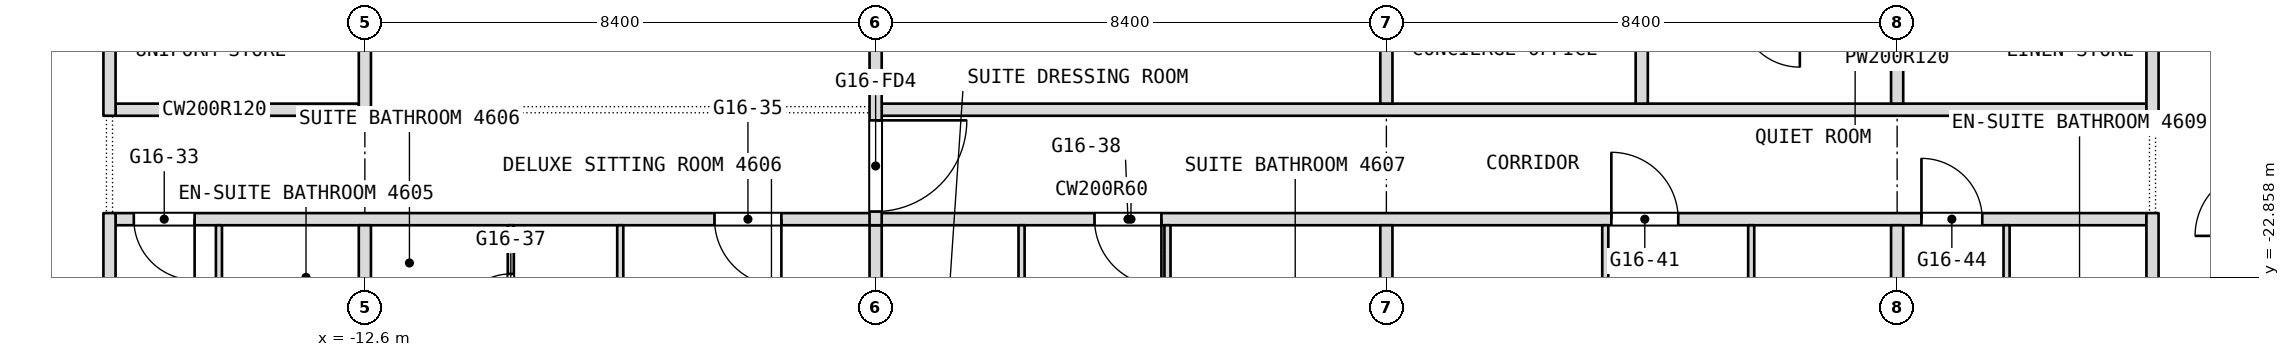
"""IFC4 building model, lengths in metres.
Left out: names, types, materials, properties, quantities, classifications, styles, units other than length and angle.
Written with IfcOpenShell. Run it as: python <this file> out.ifc"""

import sys

from ifc_helpers import new_model, si_unit, direction, frame, frame_2d, origin, place, context, subcontext, project, spatial, rectangle, extrude, element, fill, save


model = new_model("IFC4")
c1 = context("Model", 3, precision=1e-05, world=origin(), true_north=direction((0.0, 1.0)))
c2 = subcontext(c1, "Body", "Model", "MODEL_VIEW")
j1 = project(units=[si_unit("LENGTHUNIT", "METRE"), si_unit("PLANEANGLEUNIT", "RADIAN")], contexts=[c1])
p1 = place(None, origin())
s1 = spatial("IfcSite", under=j1, at=p1, CompositionType="ELEMENT")
p2 = place(p1, origin())
s2 = spatial("IfcBuilding", under=s1, at=p2, CompositionType="ELEMENT")
p3 = place(p2, frame((0.0, 0.0, 202.1)))
s3 = spatial("IfcBuildingStorey", under=s2, at=p3, CompositionType="ELEMENT", Elevation=202.1)
p4 = place(p3, frame((-16.7, -21.9, 0.0), z_axis=(0.0, 0.0, 1.0), x_axis=(1.0, 0.0, 0.0)))
e1 = element("IfcWall", 1, at=p4, inside=s3, PredefinedType="PARTITIONING", context=c2, shape_type="SweptSolid", body=[
    extrude(rectangle(XDim=33.4, YDim=0.2, at=frame_2d((16.7, 0.0))), origin(), (0.0, 0.0, 1.0), 3.34),
])
p5 = place(p4, frame((0.3, 0.0, 0.0)))
e2 = element("IfcOpeningElement", 2, at=p5, cuts=e1, PredefinedType="OPENING", context=c2, shape_type="SweptSolid", body=[
    extrude(rectangle(XDim=1.0, YDim=2.1, at=frame_2d((0.5, 1.05))), frame((0.0, 0.1, 0.0), z_axis=(0.0, -1.0, 0.0), x_axis=(1.0, 0.0, 0.0)), (0.0, 0.0, 1.0), 0.2),
])
p6 = place(p4, frame((9.85, 0.0, 0.0)))
e3 = element("IfcOpeningElement", 3, at=p6, cuts=e1, PredefinedType="OPENING", context=c2, shape_type="SweptSolid", body=[
    extrude(rectangle(XDim=1.1, YDim=2.1, at=frame_2d((0.55, 1.05))), frame((0.0, 0.1, 0.0), z_axis=(0.0, -1.0, 0.0), x_axis=(1.0, 0.0, 0.0)), (0.0, 0.0, 1.0), 0.2),
])
p7 = place(p4, frame((16.1, 0.0, 0.0)))
e4 = element("IfcOpeningElement", 4, at=p7, cuts=e1, PredefinedType="OPENING", context=c2, shape_type="SweptSolid", body=[
    extrude(rectangle(XDim=1.1, YDim=2.1, at=frame_2d((0.55, 1.05))), frame((0.0, 0.1, 0.0), z_axis=(0.0, -1.0, 0.0), x_axis=(1.0, 0.0, 0.0)), (0.0, 0.0, 1.0), 0.2),
])
p8 = place(p4, frame((24.6, 0.0, 0.0)))
e5 = element("IfcOpeningElement", 5, at=p8, cuts=e1, PredefinedType="OPENING", context=c2, shape_type="SweptSolid", body=[
    extrude(rectangle(XDim=1.1, YDim=2.1, at=frame_2d((0.55, 1.05))), frame((0.0, 0.1, 0.0), z_axis=(0.0, -1.0, 0.0), x_axis=(1.0, 0.0, 0.0)), (0.0, 0.0, 1.0), 0.2),
])
p9 = place(p4, frame((29.7, 0.0, 0.0)))
e6 = element("IfcOpeningElement", 6, at=p9, cuts=e1, PredefinedType="OPENING", context=c2, shape_type="SweptSolid", body=[
    extrude(rectangle(XDim=1.0, YDim=2.1, at=frame_2d((0.5, 1.05))), frame((0.0, 0.1, 0.0), z_axis=(0.0, -1.0, 0.0), x_axis=(1.0, 0.0, 0.0)), (0.0, 0.0, 1.0), 0.2),
])
p10 = place(p3, frame((-16.7, -20.1, 0.0), z_axis=(0.0, 0.0, 1.0), x_axis=(1.0, 0.0, 0.0)))
e7 = element("IfcWall", 7, at=p10, inside=s3, PredefinedType="PARTITIONING", context=c2, shape_type="SweptSolid", body=[
    extrude(rectangle(XDim=4.0, YDim=0.2, at=frame_2d((2.0, 0.0))), origin(), (0.0, 0.0, 1.0), 3.34),
])
p11 = place(p3, frame((-4.1, -20.1, 0.0), z_axis=(0.0, 0.0, 1.0), x_axis=(1.0, 0.0, 0.0)))
e8 = element("IfcWall", 8, at=p11, inside=s3, PredefinedType="PARTITIONING", context=c2, shape_type="SweptSolid", body=[
    extrude(rectangle(XDim=20.8, YDim=0.2, at=frame_2d((10.4, 0.0))), origin(), (0.0, 0.0, 1.0), 3.34),
])
p12 = place(p3, frame((16.8, -27.229, 0.0), z_axis=(0.0, 0.0, 1.0), x_axis=(0.0, 1.0, 0.0)))
e9 = element("IfcWall", 9, at=p12, inside=s3, PredefinedType="PARTITIONING", context=c2, shape_type="SweptSolid", body=[
    extrude(rectangle(XDim=5.429, YDim=0.2, at=frame_2d((2.714, 0.0))), origin(), (0.0, 0.0, 1.0), 3.34),
])
p13 = place(p3, frame((16.8, -20.2, 0.0), z_axis=(0.0, 0.0, 1.0), x_axis=(0.0, 1.0, 0.0)))
e10 = element("IfcWall", 10, at=p13, inside=s3, PredefinedType="PARTITIONING", context=c2, shape_type="SweptSolid", body=[
    extrude(rectangle(XDim=6.8, YDim=0.2, at=frame_2d((3.4, 0.0))), origin(), (0.0, 0.0, 1.0), 3.34),
])
p14 = place(p3, frame((14.4, -25.85, 0.0), z_axis=(0.0, 0.0, 1.0), x_axis=(0.0, 1.0, 0.0)))
e11 = element("IfcWall", 11, at=p14, inside=s3, PredefinedType="PARTITIONING", context=c2, shape_type="SweptSolid", body=[
    extrude(rectangle(XDim=3.85, YDim=0.1, at=frame_2d((1.925, 0.0))), origin(), (0.0, 0.0, 1.0), 3.34),
])
p15 = place(p3, frame((12.6, -28.343, 0.0), z_axis=(0.0, 0.0, 1.0), x_axis=(0.0, 1.0, 0.0)))
e12 = element("IfcWall", 12, at=p15, inside=s3, PredefinedType="PARTITIONING", context=c2, shape_type="SweptSolid", body=[
    extrude(rectangle(XDim=6.343, YDim=0.2, at=frame_2d((3.171, 0.0))), origin(), (0.0, 0.0, 1.0), 3.34),
])
p16 = place(p3, frame((12.6, -20.0, 0.0), z_axis=(0.0, 0.0, 1.0), x_axis=(0.0, 1.0, 0.0)))
e13 = element("IfcWall", 13, at=p16, inside=s3, PredefinedType="PARTITIONING", context=c2, shape_type="SweptSolid", body=[
    extrude(rectangle(XDim=1.5, YDim=0.2, at=frame_2d((0.75, 0.0))), origin(), (0.0, 0.0, 1.0), 3.34),
])
p17 = place(p3, frame((10.2, -25.55, 0.0), z_axis=(0.0, 0.0, 1.0), x_axis=(0.0, 1.0, 0.0)))
e14 = element("IfcWall", 14, at=p17, inside=s3, PredefinedType="PARTITIONING", context=c2, shape_type="SweptSolid", body=[
    extrude(rectangle(XDim=3.55, YDim=0.1, at=frame_2d((1.775, 0.0))), origin(), (0.0, 0.0, 1.0), 3.34),
])
p18 = place(p3, frame((8.4, -20.0, 0.0), z_axis=(0.0, 0.0, 1.0), x_axis=(0.0, 1.0, 0.0)))
e15 = element("IfcWall", 15, at=p18, inside=s3, PredefinedType="PARTITIONING", context=c2, shape_type="SweptSolid", body=[
    extrude(rectangle(XDim=1.5, YDim=0.2, at=frame_2d((0.75, 0.0))), origin(), (0.0, 0.0, 1.0), 3.34),
])
p19 = place(p3, frame((7.8, -25.45, 0.0), z_axis=(0.0, 0.0, 1.0), x_axis=(0.0, 1.0, 0.0)))
e16 = element("IfcWall", 16, at=p19, inside=s3, PredefinedType="PARTITIONING", context=c2, shape_type="SweptSolid", body=[
    extrude(rectangle(XDim=3.45, YDim=0.1, at=frame_2d((1.725, 0.0))), origin(), (0.0, 0.0, 1.0), 3.34),
])
p20 = place(p3, frame((4.2, -28.9, 0.0), z_axis=(0.0, 0.0, 1.0), x_axis=(0.0, 1.0, 0.0)))
e17 = element("IfcWall", 17, at=p20, inside=s3, PredefinedType="PARTITIONING", context=c2, shape_type="SweptSolid", body=[
    extrude(rectangle(XDim=6.9, YDim=0.2, at=frame_2d((3.45, 0.0))), origin(), (0.0, 0.0, 1.0), 3.34),
])
p21 = place(p3, frame((4.2, -20.0, 0.0), z_axis=(0.0, 0.0, 1.0), x_axis=(0.0, 1.0, 0.0)))
e18 = element("IfcWall", 18, at=p21, inside=s3, PredefinedType="PARTITIONING", context=c2, shape_type="SweptSolid", body=[
    extrude(rectangle(XDim=6.4, YDim=0.2, at=frame_2d((3.2, 0.0))), origin(), (0.0, 0.0, 1.0), 3.34),
])
p22 = place(p3, frame((0.6, -25.55, 0.0), z_axis=(0.0, 0.0, 1.0), x_axis=(0.0, 1.0, 0.0)))
e19 = element("IfcWall", 19, at=p22, inside=s3, PredefinedType="PARTITIONING", context=c2, shape_type="SweptSolid", body=[
    extrude(rectangle(XDim=3.55, YDim=0.1, at=frame_2d((1.775, 0.0))), origin(), (0.0, 0.0, 1.0), 3.34),
])
p23 = place(p3, frame((-1.8, -25.45, 0.0), z_axis=(0.0, 0.0, 1.0), x_axis=(0.0, 1.0, 0.0)))
e20 = element("IfcWall", 20, at=p23, inside=s3, PredefinedType="PARTITIONING", context=c2, shape_type="SweptSolid", body=[
    extrude(rectangle(XDim=3.45, YDim=0.1, at=frame_2d((1.725, 0.0))), origin(), (0.0, 0.0, 1.0), 3.34),
])
p24 = place(p3, frame((-4.2, -28.9, 0.0), z_axis=(0.0, 0.0, 1.0), x_axis=(0.0, 1.0, 0.0)))
e21 = element("IfcWall", 21, at=p24, inside=s3, PredefinedType="PARTITIONING", context=c2, shape_type="SweptSolid", body=[
    extrude(rectangle(XDim=6.9, YDim=0.2, at=frame_2d((3.45, 0.0))), origin(), (0.0, 0.0, 1.0), 3.34),
])
p25 = place(p3, frame((-4.2, -22.0, 0.0), z_axis=(0.0, 0.0, 1.0), x_axis=(0.0, 1.0, 0.0)))
e22 = element("IfcWall", 22, at=p25, inside=s3, PredefinedType="PARTITIONING", context=c2, shape_type="SweptSolid", body=[
    extrude(rectangle(XDim=8.4, YDim=0.2, at=frame_2d((4.2, 0.0))), origin(), (0.0, 0.0, 1.0), 3.34),
])
p26 = place(p25, frame((0.225, 0.0, 0.0)))
e23 = element("IfcOpeningElement", 23, at=p26, cuts=e22, PredefinedType="OPENING", context=c2, shape_type="SweptSolid", body=[
    extrude(rectangle(XDim=1.5, YDim=2.1, at=frame_2d((0.75, 1.05))), frame((0.0, 0.1, 0.0), z_axis=(0.0, -1.0, 0.0), x_axis=(1.0, 0.0, 0.0)), (0.0, 0.0, 1.0), 0.2),
])
p27 = place(p3, frame((-8.4, -28.9, 0.0), z_axis=(0.0, 0.0, 1.0), x_axis=(0.0, 1.0, 0.0)))
e24 = element("IfcWall", 24, at=p27, inside=s3, PredefinedType="PARTITIONING", context=c2, shape_type="SweptSolid", body=[
    extrude(rectangle(XDim=6.9, YDim=0.1, at=frame_2d((3.45, 0.0))), origin(), (0.0, 0.0, 1.0), 3.34),
])
p28 = place(p27, frame((2.53, 0.0, 0.0)))
e25 = element("IfcOpeningElement", 25, at=p28, cuts=e24, PredefinedType="OPENING", context=c2, shape_type="SweptSolid", body=[
    extrude(rectangle(XDim=0.9, YDim=2.1, at=frame_2d((0.45, 1.05))), frame((0.0, 0.05, 0.0), z_axis=(0.0, -1.0, 0.0), x_axis=(1.0, 0.0, 0.0)), (0.0, 0.0, 1.0), 0.1),
])
p29 = place(p3, frame((-10.2, -24.55, 0.0), z_axis=(0.0, 0.0, 1.0), x_axis=(0.0, 1.0, 0.0)))
e26 = element("IfcWall", 26, at=p29, inside=s3, PredefinedType="PARTITIONING", context=c2, shape_type="SweptSolid", body=[
    extrude(rectangle(XDim=2.55, YDim=0.1, at=frame_2d((1.275, 0.0))), origin(), (0.0, 0.0, 1.0), 3.34),
])
p30 = place(p29, frame((0.85, 0.0, 0.0)))
e27 = element("IfcOpeningElement", 27, at=p30, cuts=e26, PredefinedType="OPENING", context=c2, shape_type="SweptSolid", body=[
    extrude(rectangle(XDim=0.9, YDim=2.1, at=frame_2d((0.45, 1.05))), frame((0.0, 0.05, 0.0), z_axis=(0.0, -1.0, 0.0), x_axis=(1.0, 0.0, 0.0)), (0.0, 0.0, 1.0), 0.1),
])
p31 = place(p3, frame((-12.6, -28.343, 0.0), z_axis=(0.0, 0.0, 1.0), x_axis=(0.0, 1.0, 0.0)))
e28 = element("IfcWall", 28, at=p31, inside=s3, PredefinedType="PARTITIONING", context=c2, shape_type="SweptSolid", body=[
    extrude(rectangle(XDim=6.343, YDim=0.2, at=frame_2d((3.171, 0.0))), origin(), (0.0, 0.0, 1.0), 3.34),
])
p32 = place(p3, frame((-12.6, -20.2, 0.0), z_axis=(0.0, 0.0, 1.0), x_axis=(0.0, 1.0, 0.0)))
e29 = element("IfcWall", 29, at=p32, inside=s3, PredefinedType="PARTITIONING", context=c2, shape_type="SweptSolid", body=[
    extrude(rectangle(XDim=6.8, YDim=0.2, at=frame_2d((3.4, 0.0))), origin(), (0.0, 0.0, 1.0), 3.34),
])
p33 = place(p3, frame((-15.0, -24.75, 0.0), z_axis=(0.0, 0.0, 1.0), x_axis=(0.0, 1.0, 0.0)))
e30 = element("IfcWall", 30, at=p33, inside=s3, PredefinedType="PARTITIONING", context=c2, shape_type="SweptSolid", body=[
    extrude(rectangle(XDim=2.75, YDim=0.1, at=frame_2d((1.375, 0.0))), origin(), (0.0, 0.0, 1.0), 3.34),
])
p34 = place(p3, frame((-16.8, -27.229, 0.0), z_axis=(0.0, 0.0, 1.0), x_axis=(0.0, 1.0, 0.0)))
e31 = element("IfcWall", 31, at=p34, inside=s3, PredefinedType="PARTITIONING", context=c2, shape_type="SweptSolid", body=[
    extrude(rectangle(XDim=5.429, YDim=0.2, at=frame_2d((2.714, 0.0))), origin(), (0.0, 0.0, 1.0), 3.34),
])
p35 = place(p3, frame((-16.8, -20.2, 0.0), z_axis=(0.0, 0.0, 1.0), x_axis=(0.0, 1.0, 0.0)))
e32 = element("IfcWall", 32, at=p35, inside=s3, PredefinedType="PARTITIONING", context=c2, shape_type="SweptSolid", body=[
    extrude(rectangle(XDim=6.8, YDim=0.2, at=frame_2d((3.4, 0.0))), origin(), (0.0, 0.0, 1.0), 3.34),
])
p36 = place(p5, origin())
e33 = element("IfcDoor", 33, at=p36, inside=s3, OperationType="SINGLE_SWING_RIGHT", PredefinedType="DOOR", context=c2, shape_type="SweptSolid", body=[
    extrude(rectangle(XDim=1.0, YDim=2.1, at=frame_2d((0.5, 1.05))), frame((0.0, 0.025, 0.0), z_axis=(0.0, -1.0, 0.0), x_axis=(1.0, 0.0, 0.0)), (0.0, 0.0, 1.0), 0.05),
])
fill(e2, e33)
p37 = place(p6, origin())
e34 = element("IfcDoor", 34, at=p37, inside=s3, OperationType="SINGLE_SWING_LEFT", PredefinedType="DOOR", context=c2, shape_type="SweptSolid", body=[
    extrude(rectangle(XDim=1.1, YDim=2.1, at=frame_2d((0.55, 1.05))), frame((0.0, 0.025, 0.0), z_axis=(0.0, -1.0, 0.0), x_axis=(1.0, 0.0, 0.0)), (0.0, 0.0, 1.0), 0.05),
])
fill(e3, e34)
p38 = place(p7, origin())
e35 = element("IfcDoor", 35, at=p38, inside=s3, OperationType="SINGLE_SWING_LEFT", PredefinedType="DOOR", context=c2, shape_type="SweptSolid", body=[
    extrude(rectangle(XDim=1.1, YDim=2.1, at=frame_2d((0.55, 1.05))), frame((0.0, 0.025, 0.0), z_axis=(0.0, -1.0, 0.0), x_axis=(1.0, 0.0, 0.0)), (0.0, 0.0, 1.0), 0.05),
])
fill(e4, e35)
p39 = place(p8, origin())
e36 = element("IfcDoor", 36, at=p39, inside=s3, OperationType="SINGLE_SWING_RIGHT", PredefinedType="DOOR", context=c2, shape_type="SweptSolid", body=[
    extrude(rectangle(XDim=1.1, YDim=2.1, at=frame_2d((0.55, 1.05))), frame((0.0, 0.025, 0.0), z_axis=(0.0, -1.0, 0.0), x_axis=(1.0, 0.0, 0.0)), (0.0, 0.0, 1.0), 0.05),
])
fill(e5, e36)
p40 = place(p9, origin())
e37 = element("IfcDoor", 37, at=p40, inside=s3, OperationType="SINGLE_SWING_RIGHT", PredefinedType="DOOR", context=c2, shape_type="SweptSolid", body=[
    extrude(rectangle(XDim=1.0, YDim=2.1, at=frame_2d((0.5, 1.05))), frame((0.0, 0.025, 0.0), z_axis=(0.0, -1.0, 0.0), x_axis=(1.0, 0.0, 0.0)), (0.0, 0.0, 1.0), 0.05),
])
fill(e6, e37)
p41 = place(p30, origin())
e38 = element("IfcDoor", 38, at=p41, inside=s3, OperationType="SINGLE_SWING_RIGHT", PredefinedType="DOOR", context=c2, shape_type="SweptSolid", body=[
    extrude(rectangle(XDim=0.9, YDim=2.1, at=frame_2d((0.45, 1.05))), frame((0.0, 0.025, 0.0), z_axis=(0.0, -1.0, 0.0), x_axis=(1.0, 0.0, 0.0)), (0.0, 0.0, 1.0), 0.05),
])
fill(e27, e38)
p42 = place(p26, origin())
e39 = element("IfcDoor", 39, at=p42, inside=s3, OperationType="DOUBLE_DOOR_DOUBLE_SWING", PredefinedType="DOOR", context=c2, shape_type="SweptSolid", body=[
    extrude(rectangle(XDim=1.5, YDim=2.1, at=frame_2d((0.75, 1.05))), frame((0.0, 0.025, 0.0), z_axis=(0.0, -1.0, 0.0), x_axis=(1.0, 0.0, 0.0)), (0.0, 0.0, 1.0), 0.05),
])
fill(e23, e39)
save(model, sys.argv[1])
